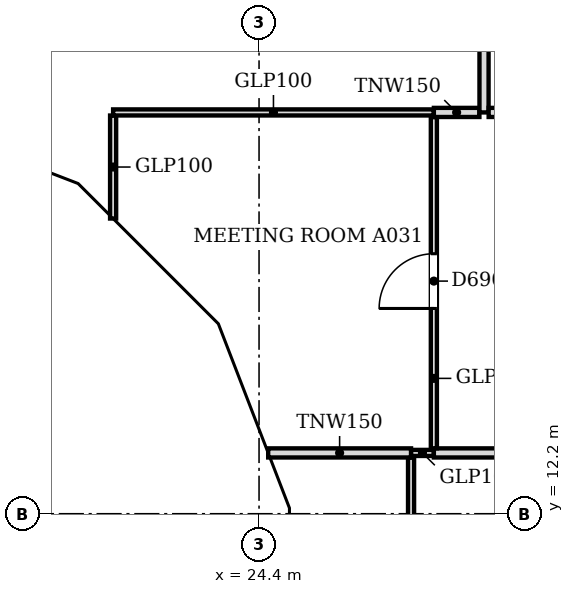
"""IFC4 building model, lengths in metres.
Left out: names, types, materials, properties, quantities, classifications, styles, units other than length and angle.
Written with IfcOpenShell. Run it as: python <this file> out.ifc"""

import sys

from ifc_helpers import new_model, si_unit, direction, frame, frame_2d, origin, place, context, subcontext, project, spatial, polyline, rectangle, outline, extrude, faceted_brep, source, transform, mapped, element, fill, save


model = new_model("IFC4")
c1 = context("Model", 3, precision=1e-05, world=origin(), true_north=direction((0.0, 1.0)))
c2 = subcontext(c1, "Body", "Model", "MODEL_VIEW")
j1 = project(units=[si_unit("LENGTHUNIT", "METRE"), si_unit("PLANEANGLEUNIT", "RADIAN")], contexts=[c1])
p1 = place(None, origin())
s1 = spatial("IfcSite", under=j1, at=p1, CompositionType="ELEMENT")
p2 = place(p1, origin())
s2 = spatial("IfcBuilding", under=s1, at=p2, CompositionType="ELEMENT")
p3 = place(p2, frame((0.0, 0.0, 120.2)))
s3 = spatial("IfcBuildingStorey", under=s2, at=p3, CompositionType="ELEMENT", Elevation=120.2)
m1 = source(origin(), c2, "Body", "Brep", [
    faceted_brep([(0.093, -0.25, 0.056), (3.143, -0.25, 3.736), (3.143, -0.25, 3.864), (0.093, -0.25, 7.544), (0.0, 0.25, 7.543), (0.047, 0.25, 7.6), (3.196, 0.25, 3.8), (0.047, 0.25, 0.0), (0.0, 0.25, 0.057), (3.196, -0.0, 3.8), (0.047, 0.0, 0.0), (0.047, 0.0, 7.6)], [[[0, 1, 2, 3]], [[4, 5, 6, 7, 8]], [[7, 6, 9, 1, 0, 10]], [[6, 5, 11, 3, 2, 9]], [[5, 4, 11]], [[8, 7, 10]], [[8, 10, 0, 3, 11, 4]], [[1, 9, 2]]]),
])
p4 = place(p3, frame((18.303, 18.567, -3.8), z_axis=(0.0, 0.0, 1.0), x_axis=(0.932978940178, -0.359930961693, 0.0)))
e1 = element("IfcWall", 1, at=p4, inside=s3, PredefinedType="SOLIDWALL", context=c2, shape_type="MappedRepresentation", body=[
    mapped(m1, transform((0.0, 0.0, 0.0), scale=1.0)),
])
m2 = source(origin(), c2, "Body", "SweptSolid", [
    extrude(outline(polyline([(0.247, 0.633), (2.871, 3.8), (0.247, 6.967), (0.247, 0.633)])), frame((0.0, 0.26, 0.0), z_axis=(0.0, -1.0, 0.0), x_axis=(1.0, 0.0, 0.0)), (0.0, 0.0, 1.0), 0.52),
])
p5 = place(p4, origin())
e2 = element("IfcOpeningElement", 2, at=p5, cuts=e1, PredefinedType="OPENING", context=c2, shape_type="MappedRepresentation", body=[
    mapped(m2, transform((0.0, 0.0, 0.0), scale=1.0)),
])
m3 = source(origin(), c2, "Body", "Brep", [
    faceted_brep([(3.103, -0.25, 7.536), (0.053, -0.25, 3.864), (0.053, -0.25, 3.736), (3.103, -0.25, 0.064), (0.0, 0.25, 3.8), (3.156, 0.25, 7.6), (3.209, 0.25, 7.536), (3.209, 0.25, 0.064), (3.156, 0.25, 0.0), (3.156, -0.0, 0.0), (3.156, -0.0, 7.6), (0.0, 0.0, 3.8)], [[[0, 1, 2, 3]], [[4, 5, 6, 7, 8]], [[8, 7, 9]], [[6, 5, 10]], [[5, 4, 11, 1, 0, 10]], [[4, 8, 9, 3, 2, 11]], [[11, 2, 1]], [[3, 9, 7, 6, 10, 0]]]),
])
p6 = place(p3, frame((21.285, 17.417, -3.8), z_axis=(0.0, 0.0, 1.0), x_axis=(0.707106781187, -0.707106781187, 0.0)))
e3 = element("IfcWall", 3, at=p6, inside=s3, PredefinedType="SOLIDWALL", context=c2, shape_type="MappedRepresentation", body=[
    mapped(m3, transform((0.0, 0.0, 0.0), scale=1.0)),
])
m4 = source(origin(), c2, "Body", "SweptSolid", [
    extrude(outline(polyline([(2.956, 6.968), (0.325, 3.8), (2.956, 0.632), (2.956, 6.968)])), frame((0.0, 0.26, 0.0), z_axis=(0.0, -1.0, 0.0), x_axis=(1.0, 0.0, 0.0)), (0.0, 0.0, 1.0), 0.52),
])
p7 = place(p6, origin())
e4 = element("IfcOpeningElement", 4, at=p7, cuts=e3, PredefinedType="OPENING", context=c2, shape_type="MappedRepresentation", body=[
    mapped(m4, transform((0.0, 0.0, 0.0), scale=1.0)),
])
m5 = source(origin(), c2, "Body", "Brep", [
    faceted_brep([(0.106, -0.25, 0.064), (3.156, -0.25, 3.744), (3.156, -0.25, 3.856), (0.106, -0.25, 7.536), (0.0, 0.25, 7.536), (0.053, 0.25, 7.6), (3.202, 0.25, 3.8), (0.053, 0.25, 0.0), (0.0, 0.25, 0.064), (3.202, -0.0, 3.8), (0.053, 0.0, 0.0), (0.053, 0.0, 7.6)], [[[0, 1, 2, 3]], [[4, 5, 6, 7, 8]], [[7, 6, 9, 1, 0, 10]], [[6, 5, 11, 3, 2, 9]], [[5, 4, 11]], [[8, 7, 10]], [[8, 10, 0, 3, 11, 4]], [[1, 9, 2]]]),
])
p8 = place(p3, frame((23.497, 15.234, -3.8), z_axis=(0.0, 0.0, 1.0), x_axis=(0.359913782069, -0.932985567668, 0.0)))
e5 = element("IfcWall", 5, at=p8, inside=s3, PredefinedType="SOLIDWALL", context=c2, shape_type="MappedRepresentation", body=[
    mapped(m5, transform((0.0, 0.0, 0.0), scale=1.0)),
])
m6 = source(origin(), c2, "Body", "SweptSolid", [
    extrude(outline(polyline([(0.253, 0.633), (2.878, 3.8), (0.253, 6.967), (0.253, 0.633)])), frame((0.0, 0.26, 0.0), z_axis=(0.0, -1.0, 0.0), x_axis=(1.0, 0.0, 0.0)), (0.0, 0.0, 1.0), 0.52),
])
p9 = place(p8, origin())
e6 = element("IfcOpeningElement", 6, at=p9, cuts=e5, PredefinedType="OPENING", context=c2, shape_type="MappedRepresentation", body=[
    mapped(m6, transform((0.0, 0.0, 0.0), scale=1.0)),
])
m7 = source(origin(), c2, "Body", "Brep", [
    faceted_brep([(3.096, -0.25, 0.0), (6.1, -0.25, 3.8), (3.096, -0.25, 7.6), (0.047, -0.25, 3.857), (0.047, -0.25, 3.743), (0.0, 0.25, 3.8), (3.096, 0.25, 7.6), (6.053, 0.25, 3.859), (6.053, 0.25, 3.741), (3.096, 0.25, 0.0), (6.1, -0.0, 3.8), (0.0, 0.0, 3.8)], [[[0, 1, 2, 3, 4]], [[5, 6, 7, 8, 9]], [[9, 8, 10, 1, 0]], [[7, 6, 2, 1, 10]], [[6, 5, 11, 3, 2]], [[5, 9, 0, 4, 11]], [[11, 4, 3]], [[10, 8, 7]]]),
])
p10 = place(p3, frame((24.65, 12.247, -3.8), z_axis=(0.0, 0.0, 1.0), x_axis=(0.0, -1.0, 0.0)))
e7 = element("IfcWall", 7, at=p10, inside=s3, PredefinedType="SOLIDWALL", context=c2, shape_type="MappedRepresentation", body=[
    mapped(m7, transform((0.0, 0.0, 0.0), scale=1.0)),
])
m8 = source(origin(), c2, "Body", "SweptSolid", [
    extrude(outline(polyline([(3.094, 0.399), (5.781, 3.8), (3.094, 7.201), (0.323, 3.8), (3.094, 0.399)])), frame((0.0, 0.26, 0.0), z_axis=(0.0, -1.0, 0.0), x_axis=(1.0, 0.0, 0.0)), (0.0, 0.0, 1.0), 0.52),
])
p11 = place(p10, origin())
e8 = element("IfcOpeningElement", 8, at=p11, cuts=e7, PredefinedType="OPENING", context=c2, shape_type="MappedRepresentation", body=[
    mapped(m8, transform((0.0, 0.0, 0.0), scale=1.0)),
])
p12 = place(p2, frame((0.0, 0.0, 124.0)))
s4 = spatial("IfcBuildingStorey", under=s2, at=p12, CompositionType="ELEMENT", Elevation=124.0)
m9 = source(origin(), c2, "Body", "Brep", [
    faceted_brep([(3.096, -0.25, 7.536), (0.047, -0.25, 3.856), (0.047, -0.25, 3.744), (3.096, -0.25, 0.064), (0.0, 0.25, 3.8), (3.149, 0.25, 7.6), (3.202, 0.25, 7.536), (3.202, 0.25, 0.064), (3.149, 0.25, 0.0), (3.149, -0.0, 0.0), (3.149, -0.0, 7.6), (0.0, 0.0, 3.8)], [[[0, 1, 2, 3]], [[4, 5, 6, 7, 8]], [[8, 7, 9]], [[6, 5, 10]], [[5, 4, 11, 1, 0, 10]], [[4, 8, 9, 3, 2, 11]], [[11, 2, 1]], [[3, 9, 7, 6, 10, 0]]]),
])
p13 = place(p12, frame((18.346, 18.55, -3.8), z_axis=(0.0, 0.0, 1.0), x_axis=(0.932985567668, -0.359913782069, 0.0)))
e9 = element("IfcWall", 9, at=p13, inside=s4, PredefinedType="SOLIDWALL", context=c2, shape_type="MappedRepresentation", body=[
    mapped(m9, transform((0.0, 0.0, 0.0), scale=1.0)),
])
m10 = source(origin(), c2, "Body", "SweptSolid", [
    extrude(outline(polyline([(2.949, 6.967), (0.325, 3.8), (2.949, 0.633), (2.949, 6.967)])), frame((0.0, 0.26, 0.0), z_axis=(0.0, -1.0, 0.0), x_axis=(1.0, 0.0, 0.0)), (0.0, 0.0, 1.0), 0.52),
])
p14 = place(p13, origin())
e10 = element("IfcOpeningElement", 10, at=p14, cuts=e9, PredefinedType="OPENING", context=c2, shape_type="MappedRepresentation", body=[
    mapped(m10, transform((0.0, 0.0, 0.0), scale=1.0)),
])
m11 = source(origin(), c2, "Body", "Brep", [
    faceted_brep([(0.106, -0.25, 0.064), (3.156, -0.25, 3.736), (3.156, -0.25, 3.864), (0.106, -0.25, 7.536), (0.0, 0.25, 7.536), (0.053, 0.25, 7.6), (3.209, 0.25, 3.8), (0.053, 0.25, 0.0), (0.0, 0.25, 0.064), (3.209, -0.0, 3.8), (0.053, 0.0, 0.0), (0.053, 0.0, 7.6)], [[[0, 1, 2, 3]], [[4, 5, 6, 7, 8]], [[7, 6, 9, 1, 0, 10]], [[6, 5, 11, 3, 2, 9]], [[5, 4, 11]], [[8, 7, 10]], [[8, 10, 0, 3, 11, 4]], [[1, 9, 2]]]),
])
p15 = place(p12, frame((21.248, 17.454, -3.8), z_axis=(0.0, 0.0, 1.0), x_axis=(0.707106781187, -0.707106781187, 0.0)))
e11 = element("IfcWall", 11, at=p15, inside=s4, PredefinedType="SOLIDWALL", context=c2, shape_type="MappedRepresentation", body=[
    mapped(m11, transform((0.0, 0.0, 0.0), scale=1.0)),
])
m12 = source(origin(), c2, "Body", "SweptSolid", [
    extrude(outline(polyline([(0.253, 0.632), (2.884, 3.8), (0.253, 6.968), (0.253, 0.632)])), frame((0.0, 0.26, 0.0), z_axis=(0.0, -1.0, 0.0), x_axis=(1.0, 0.0, 0.0)), (0.0, 0.0, 1.0), 0.52),
])
p16 = place(p15, origin())
e12 = element("IfcOpeningElement", 12, at=p16, cuts=e11, PredefinedType="OPENING", context=c2, shape_type="MappedRepresentation", body=[
    mapped(m12, transform((0.0, 0.0, 0.0), scale=1.0)),
])
m13 = source(origin(), c2, "Body", "Brep", [
    faceted_brep([(3.103, -0.25, 7.544), (0.053, -0.25, 3.864), (0.053, -0.25, 3.736), (3.103, -0.25, 0.056), (0.0, 0.25, 3.8), (3.149, 0.25, 7.6), (3.196, 0.25, 7.543), (3.196, 0.25, 0.057), (3.149, 0.25, 0.0), (3.149, -0.0, 0.0), (3.149, -0.0, 7.6), (0.0, 0.0, 3.8)], [[[0, 1, 2, 3]], [[4, 5, 6, 7, 8]], [[8, 7, 9]], [[6, 5, 10]], [[5, 4, 11, 1, 0, 10]], [[4, 8, 9, 3, 2, 11]], [[11, 2, 1]], [[3, 9, 7, 6, 10, 0]]]),
])
p17 = place(p12, frame((23.517, 15.185, -3.8), z_axis=(0.0, 0.0, 1.0), x_axis=(0.359864468756, -0.933004589553, 0.0)))
e13 = element("IfcWall", 13, at=p17, inside=s4, PredefinedType="SOLIDWALL", context=c2, shape_type="MappedRepresentation", body=[
    mapped(m13, transform((0.0, 0.0, 0.0), scale=1.0)),
])
p18 = place(p17, origin())
e14 = element("IfcOpeningElement", 14, at=p18, cuts=e13, PredefinedType="OPENING", context=c2, shape_type="MappedRepresentation", body=[
    mapped(m10, transform((0.0, 0.0, 0.0), scale=1.0)),
])
m14 = source(origin(), c2, "Body", "Brep", [
    faceted_brep([(0.093, -0.25, 0.057), (3.143, -0.25, 3.8), (0.093, -0.25, 7.543), (0.0, 0.25, 7.544), (0.047, 0.25, 7.6), (3.143, 0.25, 3.8), (0.047, 0.25, 0.0), (0.0, 0.25, 0.056), (0.047, 0.0, 0.0), (0.047, 0.0, 7.6)], [[[0, 1, 2]], [[3, 4, 5, 6, 7]], [[6, 5, 1, 0, 8]], [[5, 4, 9, 2, 1]], [[4, 3, 9]], [[7, 6, 8]], [[7, 8, 0, 2, 9, 3]]]),
])
p19 = place(p12, frame((24.65, 12.293, -3.8), z_axis=(0.0, 0.0, 1.0), x_axis=(0.0, -1.0, 0.0)))
e15 = element("IfcWall", 15, at=p19, inside=s4, PredefinedType="SOLIDWALL", context=c2, shape_type="MappedRepresentation", body=[
    mapped(m14, transform((0.0, 0.0, 0.0), scale=1.0)),
])
m15 = source(origin(), c2, "Body", "SweptSolid", [
    extrude(outline(polyline([(0.247, 0.641), (2.821, 3.8), (0.247, 6.959), (0.247, 0.641)])), frame((0.0, 0.26, 0.0), z_axis=(0.0, -1.0, 0.0), x_axis=(1.0, 0.0, 0.0)), (0.0, 0.0, 1.0), 0.52),
])
p20 = place(p19, origin())
e16 = element("IfcOpeningElement", 16, at=p20, cuts=e15, PredefinedType="OPENING", context=c2, shape_type="MappedRepresentation", body=[
    mapped(m15, transform((0.0, 0.0, 0.0), scale=1.0)),
])
p21 = place(p3, frame((26.9, 4.2, 0.0), z_axis=(0.0, 0.0, 1.0), x_axis=(0.0, 1.0, 0.0)))
e17 = element("IfcWall", 17, at=p21, inside=s3, PredefinedType="PARTITIONING", context=c2, shape_type="SweptSolid", body=[
    extrude(rectangle(XDim=8.924, YDim=0.1, at=frame_2d((4.462, 0.0))), origin(), (0.0, 0.0, 1.0), 3.067),
])
m16 = source(origin(), c2, "Body", "SweptSolid", [
    extrude(rectangle(XDim=0.9, YDim=2.1, at=frame_2d((0.45, 1.05))), frame((0.0, 0.06, 0.0), z_axis=(0.0, -1.0, 0.0), x_axis=(1.0, 0.0, 0.0)), (0.0, 0.0, 1.0), 0.12),
])
p22 = place(p21, frame((6.416, 0.0, 0.0)))
e18 = element("IfcOpeningElement", 18, at=p22, cuts=e17, PredefinedType="OPENING", context=c2, shape_type="MappedRepresentation", body=[
    mapped(m16, transform((0.0, 0.0, 0.0), scale=1.0)),
])
p23 = place(p21, frame((2.0, 0.0, 0.0)))
e19 = element("IfcOpeningElement", 19, at=p23, cuts=e17, PredefinedType="OPENING", context=c2, shape_type="MappedRepresentation", body=[
    mapped(m16, transform((0.0, 0.0, 0.0), scale=1.0)),
])
p24 = place(p3, frame((24.55, 13.2, 0.0), z_axis=(0.0, 0.0, 1.0), x_axis=(1.0, 0.0, 0.0)))
e20 = element("IfcWall", 20, at=p24, inside=s3, PredefinedType="PARTITIONING", context=c2, shape_type="SweptSolid", body=[
    extrude(rectangle(XDim=2.35, YDim=0.15, at=frame_2d((1.175, 0.0))), origin(), (0.0, 0.0, 1.0), 3.067),
])
p25 = place(p3, frame((26.901, 13.2, 0.0), z_axis=(0.0, 0.0, 1.0), x_axis=(1.0, 0.0, 0.0)))
e21 = element("IfcWall", 21, at=p25, inside=s3, PredefinedType="PARTITIONING", context=c2, shape_type="SweptSolid", body=[
    extrude(rectangle(XDim=0.373, YDim=0.1, at=frame_2d((0.187, 0.0))), origin(), (0.0, 0.0, 1.0), 3.067),
])
p26 = place(p3, frame((27.275, 13.2, 0.0), z_axis=(0.0, 0.0, 1.0), x_axis=(1.0, 0.0, 0.0)))
e22 = element("IfcWall", 22, at=p26, inside=s3, PredefinedType="PARTITIONING", context=c2, shape_type="SweptSolid", body=[
    extrude(rectangle(XDim=16.649, YDim=0.15, at=frame_2d((8.325, 0.0))), origin(), (0.0, 0.0, 1.0), 3.067),
])
p27 = place(p3, frame((27.275, 13.276, 0.0), z_axis=(0.0, 0.0, 1.0), x_axis=(0.0, 1.0, 0.0)))
e23 = element("IfcWall", 23, at=p27, inside=s3, PredefinedType="PARTITIONING", context=c2, shape_type="SweptSolid", body=[
    extrude(rectangle(XDim=5.448, YDim=0.1, at=frame_2d((2.724, 0.0))), origin(), (0.0, 0.0, 1.0), 3.067),
])
p28 = place(p27, frame((2.3, 0.0, 0.0)))
e24 = element("IfcOpeningElement", 24, at=p28, cuts=e23, PredefinedType="OPENING", context=c2, shape_type="MappedRepresentation", body=[
    mapped(m16, transform((0.0, 0.0, 0.0), scale=1.0)),
])
p29 = place(p3, frame((22.0, 17.055, 0.0), z_axis=(0.0, 0.0, 1.0), x_axis=(0.0, 1.0, 0.0)))
e25 = element("IfcWall", 25, at=p29, inside=s3, PredefinedType="PARTITIONING", context=c2, shape_type="SweptSolid", body=[
    extrude(rectangle(XDim=1.694, YDim=0.1, at=frame_2d((0.847, 0.0))), origin(), (0.0, 0.0, 1.0), 3.067),
])
p30 = place(p3, frame((22.0, 18.8, 0.0), z_axis=(0.0, 0.0, 1.0), x_axis=(1.0, 0.0, 0.0)))
e26 = element("IfcWall", 26, at=p30, inside=s3, PredefinedType="PARTITIONING", context=c2, shape_type="SweptSolid", body=[
    extrude(rectangle(XDim=5.274, YDim=0.1, at=frame_2d((2.637, 0.0))), origin(), (0.0, 0.0, 1.0), 3.067),
])
p31 = place(p3, frame((27.275, 18.8, 0.0), z_axis=(0.0, 0.0, 1.0), x_axis=(1.0, 0.0, 0.0)))
e27 = element("IfcWall", 27, at=p31, inside=s3, PredefinedType="PARTITIONING", context=c2, shape_type="SweptSolid", body=[
    extrude(rectangle(XDim=0.749, YDim=0.15, at=frame_2d((0.375, 0.0))), origin(), (0.0, 0.0, 1.0), 3.067),
])
p32 = place(p3, frame((28.1, 18.8, 0.0), z_axis=(0.0, 0.0, 1.0), x_axis=(0.0, 1.0, 0.0)))
e28 = element("IfcWall", 28, at=p32, inside=s3, PredefinedType="PARTITIONING", context=c2, shape_type="SweptSolid", body=[
    extrude(rectangle(XDim=26.024, YDim=0.15, at=frame_2d((13.012, 0.0))), origin(), (0.0, 0.0, 1.0), 3.067),
])
m17 = source(origin(), c2, "Body", "SweptSolid", [
    extrude(rectangle(XDim=0.9, YDim=2.1, at=frame_2d((0.45, 1.05))), frame((0.0, 0.085, 0.0), z_axis=(0.0, -1.0, 0.0), x_axis=(1.0, 0.0, 0.0)), (0.0, 0.0, 1.0), 0.17),
])
p33 = place(p32, frame((1.1, 0.0, 0.0)))
e29 = element("IfcOpeningElement", 29, at=p33, cuts=e28, PredefinedType="OPENING", context=c2, shape_type="MappedRepresentation", body=[
    mapped(m17, transform((0.0, 0.0, 0.0), scale=1.0)),
])
p34 = place(p32, frame((14.301, 0.0, 0.0)))
e30 = element("IfcOpeningElement", 30, at=p34, cuts=e28, PredefinedType="OPENING", context=c2, shape_type="MappedRepresentation", body=[
    mapped(m17, transform((0.0, 0.0, 0.0), scale=1.0)),
])
p35 = place(p32, frame((8.2, 0.0, 0.0)))
e31 = element("IfcOpeningElement", 31, at=p35, cuts=e28, PredefinedType="OPENING", context=c2, shape_type="MappedRepresentation", body=[
    mapped(m17, transform((0.0, 0.0, 0.0), scale=1.0)),
])
p36 = place(p32, frame((21.5, 0.0, 0.0)))
e32 = element("IfcOpeningElement", 32, at=p36, cuts=e28, PredefinedType="OPENING", context=c2, shape_type="MappedRepresentation", body=[
    mapped(m17, transform((0.0, 0.0, 0.0), scale=1.0)),
])
p37 = place(p3, frame((28.176, 18.8, 0.0), z_axis=(0.0, 0.0, 1.0), x_axis=(1.0, 0.0, 0.0)))
e33 = element("IfcWall", 33, at=p37, inside=s3, PredefinedType="PARTITIONING", context=c2, shape_type="SweptSolid", body=[
    extrude(rectangle(XDim=2.248, YDim=0.15, at=frame_2d((1.124, 0.0))), origin(), (0.0, 0.0, 1.0), 3.067),
])
m18 = source(origin(), c2, "Body", "SweptSolid", [
    extrude(rectangle(XDim=0.9, YDim=2.1, at=frame_2d((0.45, 1.05))), frame((0.0, 0.025, 0.0), z_axis=(0.0, -1.0, 0.0), x_axis=(1.0, 0.0, 0.0)), (0.0, 0.0, 1.0), 0.05),
])
p38 = place(p28, origin())
e34 = element("IfcDoor", 34, at=p38, inside=s3, OperationType="SINGLE_SWING_LEFT", PredefinedType="DOOR", context=c2, shape_type="MappedRepresentation", body=[
    mapped(m18, transform((0.0, 0.0, 0.0), scale=1.0)),
])
fill(e24, e34)
save(model, sys.argv[1])
